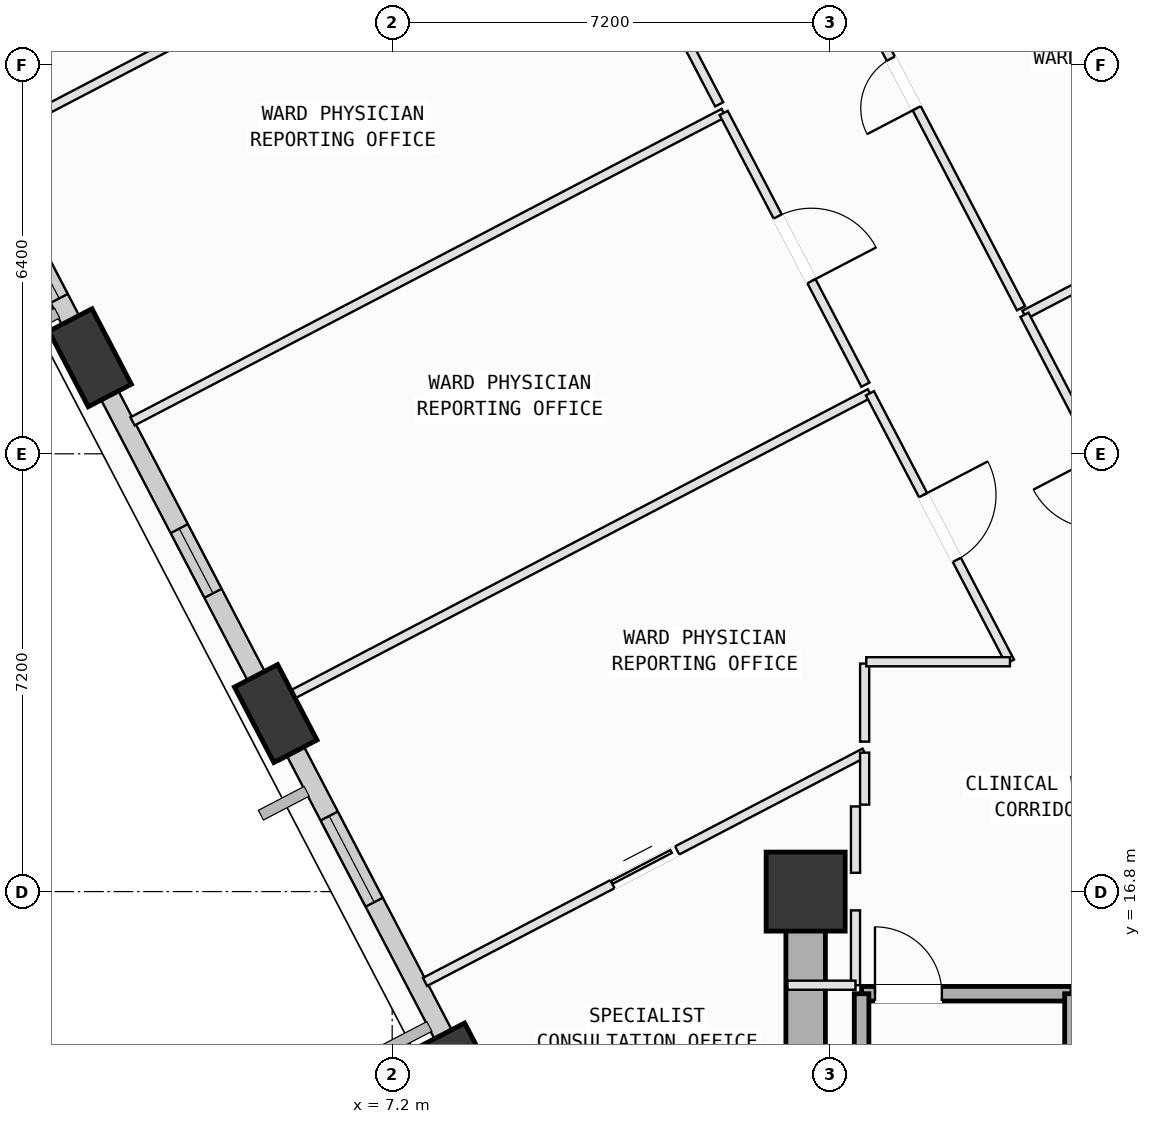
"""IFC4 building model, lengths in metres.
Left out: names, types, materials, properties, quantities, classifications, styles, units other than length and angle.
Written with IfcOpenShell. Run it as: python <this file> out.ifc"""

import sys

from ifc_helpers import new_model, si_unit, direction, frame, frame_2d, origin, origin_2d, place, context, subcontext, project, spatial, rectangle, extrude, element, fill, save


model = new_model("IFC4")
c1 = context("Model", 3, precision=1e-05, world=origin(), true_north=direction((0.0, 1.0)))
c2 = subcontext(c1, "Body", "Model", "MODEL_VIEW")
j1 = project(units=[si_unit("LENGTHUNIT", "METRE"), si_unit("PLANEANGLEUNIT", "RADIAN")], contexts=[c1])
p1 = place(None, origin())
s1 = spatial("IfcSite", under=j1, at=p1, CompositionType="ELEMENT")
p2 = place(p1, origin())
s2 = spatial("IfcBuilding", under=s1, at=p2, CompositionType="ELEMENT")
p3 = place(p2, frame((0.0, 0.0, 140.4)))
s3 = spatial("IfcBuildingStorey", under=s2, at=p3, CompositionType="ELEMENT", Elevation=140.4)
p4 = place(p3, frame((14.0, 16.8, 0.0), z_axis=(0.0, 0.0, 1.0), x_axis=(1.0, 0.0, 0.0)))
e1 = element("IfcColumn", 1, at=p4, inside=s3, PredefinedType="COLUMN", context=c2, shape_type="SweptSolid", body=[
    extrude(rectangle(XDim=1.3, YDim=1.3, at=origin_2d()), origin(), (0.0, 0.0, 1.0), 4.0),
])
p5 = place(p3, frame((2.232, 25.58, 0.002), z_axis=(-0.00211503443, -0.129017100255, 0.991640113384), x_axis=(-0.448049256138, 0.886658806791, 0.114402903869)))
e2 = element("IfcColumn", 2, at=p5, inside=s3, PredefinedType="COLUMN", context=c2, shape_type="SweptSolid", body=[
    extrude(rectangle(XDim=1.4, YDim=0.8, at=origin_2d()), origin(), (0.0, 0.0, 1.0), 3.925),
])
p6 = place(p3, frame((5.285, 19.728, 0.002), z_axis=(0.021879443382, -0.116358857988, 0.992966216004), x_axis=(-0.617245268463, 0.779736515973, 0.104972587944)))
e3 = element("IfcColumn", 3, at=p6, inside=s3, PredefinedType="COLUMN", context=c2, shape_type="SweptSolid", body=[
    extrude(rectangle(XDim=1.4, YDim=0.8, at=origin_2d()), origin(), (0.0, 0.0, 1.0), 3.928),
])
p7 = place(p3, frame((8.361, 13.833, 0.002), z_axis=(0.046037098105, -0.103567938652, 0.993556373681), x_axis=(-0.780457920553, 0.617080020514, 0.100487225696)))
e4 = element("IfcColumn", 4, at=p7, inside=s3, PredefinedType="COLUMN", context=c2, shape_type="SweptSolid", body=[
    extrude(rectangle(XDim=1.4, YDim=0.8, at=origin_2d()), origin(), (0.0, 0.0, 1.0), 3.93),
])
p8 = place(p3, frame((2.116, 25.803, 0.0), z_axis=(0.0, 0.0, 1.0), x_axis=(-0.462506359197, 0.886615964046, 0.0)))
e5 = element("IfcWall", 5, at=p8, inside=s3, PredefinedType="SOLIDWALL", context=c2, shape_type="SweptSolid", body=[
    extrude(rectangle(XDim=5.456, YDim=0.32, at=frame_2d((2.728, 0.0))), origin(), (0.0, 0.0, 1.0), 3.085),
])
p9 = place(p8, frame((0.848, 0.0, 0.75)))
e6 = element("IfcOpeningElement", 6, at=p9, cuts=e5, PredefinedType="OPENING", context=c2, shape_type="SweptSolid", body=[
    extrude(rectangle(XDim=1.8, YDim=2.05, at=frame_2d((0.9, 1.025))), frame((0.0, 0.17, 0.0), z_axis=(0.0, -1.0, 0.0), x_axis=(1.0, 0.0, 0.0)), (0.0, 0.0, 1.0), 0.34),
])
p10 = place(p3, frame((5.163, 19.962, 0.0), z_axis=(0.0, 0.0, 1.0), x_axis=(-0.462505217962, 0.886616559375, 0.0)))
e7 = element("IfcWall", 7, at=p10, inside=s3, PredefinedType="SOLIDWALL", context=c2, shape_type="SweptSolid", body=[
    extrude(rectangle(XDim=5.628, YDim=0.32, at=frame_2d((2.814, 0.0))), origin(), (0.0, 0.0, 1.0), 3.085),
])
p11 = place(p10, frame((1.967, 0.0, 0.75)))
e8 = element("IfcOpeningElement", 8, at=p11, cuts=e7, PredefinedType="OPENING", context=c2, shape_type="SweptSolid", body=[
    extrude(rectangle(XDim=1.2, YDim=1.75, at=frame_2d((0.6, 0.875))), frame((0.0, 0.17, 0.0), z_axis=(0.0, -1.0, 0.0), x_axis=(1.0, 0.0, 0.0)), (0.0, 0.0, 1.0), 0.34),
])
p12 = place(p3, frame((8.237, 14.071, 0.0), z_axis=(0.0, 0.0, 1.0), x_axis=(-0.462514432268, 0.886611752654, 0.0)))
e9 = element("IfcWall", 9, at=p12, inside=s3, PredefinedType="SOLIDWALL", context=c2, shape_type="SweptSolid", body=[
    extrude(rectangle(XDim=5.662, YDim=0.32, at=frame_2d((2.831, 0.0))), origin(), (0.0, 0.0, 1.0), 3.085),
])
p13 = place(p12, frame((2.881, 0.0, 0.75)))
e10 = element("IfcOpeningElement", 10, at=p13, cuts=e9, PredefinedType="OPENING", context=c2, shape_type="SweptSolid", body=[
    extrude(rectangle(XDim=1.6, YDim=1.95, at=frame_2d((0.8, 0.975))), frame((0.0, 0.17, 0.0), z_axis=(0.0, -1.0, 0.0), x_axis=(1.0, 0.0, 0.0)), (0.0, 0.0, 1.0), 0.34),
])
p14 = place(p3, frame((14.92, 15.12, 0.0), z_axis=(0.0, 0.0, 1.0), x_axis=(1.0, 0.0, 0.0)))
e11 = element("IfcWall", 11, at=p14, inside=s3, PredefinedType="SOLIDWALL", context=c2, shape_type="SweptSolid", body=[
    extrude(rectangle(XDim=3.46, YDim=0.24, at=frame_2d((1.73, 0.0))), origin(), (0.0, 0.0, 1.0), 3.7),
])
p15 = place(p14, frame((0.22, 0.0, 0.0)))
e12 = element("IfcOpeningElement", 12, at=p15, cuts=e11, PredefinedType="OPENING", context=c2, shape_type="SweptSolid", body=[
    extrude(rectangle(XDim=1.1, YDim=2.15, at=frame_2d((0.55, 1.075))), frame((0.0, 0.13, 0.0), z_axis=(0.0, -1.0, 0.0), x_axis=(1.0, 0.0, 0.0)), (0.0, 0.0, 1.0), 0.26),
])
for number, where, z_axis, x_axis in (
    (13, (18.38, 15.12, 0.0), (0.0, 0.0, 1.0), (0.0, -1.0, 0.0)),
    (14, (14.92, 8.125, 0.0), (0.0, 0.0, 1.0), (0.0, 1.0, 0.0)),
):
    element("IfcWall", number, at=place(p3, frame(where, z_axis=z_axis, x_axis=x_axis)), inside=s3, PredefinedType="SOLIDWALL", context=c2, shape_type="SweptSolid", body=[
        extrude(rectangle(XDim=6.995, YDim=0.24, at=frame_2d((3.498, 0.0))), origin(), (0.0, 0.0, 1.0), 3.7),
    ])
p16 = place(p3, frame((14.0, 16.8, 0.0), z_axis=(0.0, 0.0, 1.0), x_axis=(0.0, -1.0, 0.0)))
e15 = element("IfcWall", 15, at=p16, inside=s3, PredefinedType="SHEAR", context=c2, shape_type="SweptSolid", body=[
    extrude(rectangle(XDim=9.0, YDim=0.65, at=frame_2d((4.5, 0.0))), origin(), (0.0, 0.0, 1.0), 3.7),
])
p17 = place(p3, frame((14.82, 18.2, 0.0), z_axis=(0.0, 0.0, 1.0), x_axis=(0.0, -1.0, 0.0)))
e16 = element("IfcWall", 16, at=p17, inside=s3, PredefinedType="PARTITIONING", context=c2, shape_type="SweptSolid", body=[
    extrude(rectangle(XDim=1.091, YDim=0.15, at=frame_2d((0.545, 0.0))), origin(), (0.0, 0.0, 1.0), 3.7),
])
p18 = place(p3, frame((14.82, 16.491, 0.0), z_axis=(0.0, 0.0, 1.0), x_axis=(0.0, -1.0, 0.0)))
e17 = element("IfcWall", 17, at=p18, inside=s3, PredefinedType="PARTITIONING", context=c2, shape_type="SweptSolid", body=[
    extrude(rectangle(XDim=1.231, YDim=0.15, at=frame_2d((0.615, 0.0))), origin(), (0.0, 0.0, 1.0), 3.7),
])
p19 = place(p3, frame((14.82, 15.26, 0.0), z_axis=(0.0, 0.0, 1.0), x_axis=(-1.0, 0.0, 0.0)))
e18 = element("IfcWall", 18, at=p19, inside=s3, PredefinedType="PARTITIONING", context=c2, shape_type="SweptSolid", body=[
    extrude(rectangle(XDim=1.12, YDim=0.15, at=frame_2d((0.56, 0.0))), origin(), (0.0, 0.0, 1.0), 3.7),
])
p20 = place(p3, frame((7.74, 15.314, 0.0), z_axis=(0.0, 0.0, 1.0), x_axis=(0.886643562376, 0.46245344987, 0.0)))
e19 = element("IfcWall", 19, at=p20, inside=s3, PredefinedType="PARTITIONING", context=c2, shape_type="SweptSolid", body=[
    extrude(rectangle(XDim=8.154, YDim=0.15, at=frame_2d((4.077, 0.0))), origin(), (0.0, 0.0, 1.0), 3.7),
])
p21 = place(p20, frame((3.477, 0.0, 0.0)))
e20 = element("IfcOpeningElement", 20, at=p21, cuts=e19, PredefinedType="OPENING", context=c2, shape_type="SweptSolid", body=[
    extrude(rectangle(XDim=1.2, YDim=2.15, at=frame_2d((0.6, 1.075))), frame((0.0, 0.085, 0.0), z_axis=(0.0, -1.0, 0.0), x_axis=(1.0, 0.0, 0.0)), (0.0, 0.0, 1.0), 0.17),
])
p22 = place(p3, frame((14.97, 19.085, 0.0), z_axis=(0.0, 0.0, 1.0), x_axis=(0.0, -1.0, 0.0)))
e21 = element("IfcWall", 21, at=p22, inside=s3, PredefinedType="PARTITIONING", context=c2, shape_type="SweptSolid", body=[
    extrude(rectangle(XDim=0.855, YDim=0.15, at=frame_2d((0.427, 0.0))), origin(), (0.0, 0.0, 1.0), 3.7),
])
p23 = place(p3, frame((14.97, 20.55, 0.0), z_axis=(0.0, 0.0, 1.0), x_axis=(0.0, -1.0, 0.0)))
e22 = element("IfcWall", 22, at=p23, inside=s3, PredefinedType="PARTITIONING", context=c2, shape_type="SweptSolid", body=[
    extrude(rectangle(XDim=1.284, YDim=0.15, at=frame_2d((0.642, 0.0))), origin(), (0.0, 0.0, 1.0), 2.885),
])
p24 = place(p3, frame((5.414, 18.984, 0.0), z_axis=(0.0, 0.0, 1.0), x_axis=(-0.462422071375, 0.886659927991, 0.0)))
e23 = element("IfcWall", 23, at=p24, inside=s3, PredefinedType="PARTITIONING", context=c2, shape_type="SweptSolid", body=[
    extrude(rectangle(XDim=0.87, YDim=0.15, at=frame_2d((0.435, 0.0))), origin(), (0.0, 0.0, 1.0), 3.085),
])
p25 = place(p3, frame((5.28, 19.895, 0.0), z_axis=(0.0, 0.0, 1.0), x_axis=(0.886580898603, 0.462573572777, 0.0)))
e24 = element("IfcWall", 24, at=p25, inside=s3, PredefinedType="PARTITIONING", context=c2, shape_type="SweptSolid", body=[
    extrude(rectangle(XDim=11.028, YDim=0.15, at=frame_2d((5.514, 0.0))), origin(), (0.0, 0.0, 1.0), 3.7),
])
p26 = place(p3, frame((15.057, 24.996, 0.0), z_axis=(0.0, 0.0, 1.0), x_axis=(0.462442035221, -0.886649515908, 0.0)))
e25 = element("IfcWall", 25, at=p26, inside=s3, PredefinedType="PARTITIONING", context=c2, shape_type="SweptSolid", body=[
    extrude(rectangle(XDim=4.98, YDim=0.15, at=frame_2d((2.49, 0.0))), origin(), (0.0, 0.0, 1.0), 3.7),
])
p27 = place(p26, frame((1.89, 0.0, 0.0)))
e26 = element("IfcOpeningElement", 26, at=p27, cuts=e25, PredefinedType="OPENING", context=c2, shape_type="SweptSolid", body=[
    extrude(rectangle(XDim=1.2, YDim=2.15, at=frame_2d((0.6, 1.075))), frame((0.0, 0.085, 0.0), z_axis=(0.0, -1.0, 0.0), x_axis=(1.0, 0.0, 0.0)), (0.0, 0.0, 1.0), 0.17),
])
p28 = place(p3, frame((17.36, 20.58, 0.0), z_axis=(0.0, 0.0, 1.0), x_axis=(-1.0, 0.0, 0.0)))
e27 = element("IfcWall", 27, at=p28, inside=s3, PredefinedType="PARTITIONING", context=c2, shape_type="SweptSolid", body=[
    extrude(rectangle(XDim=2.363, YDim=0.15, at=frame_2d((1.182, 0.0))), origin(), (0.0, 0.0, 1.0), 3.7),
])
p29 = place(p3, frame((2.93, 24.534, 0.0), z_axis=(0.0, 0.0, 1.0), x_axis=(0.886600327973, 0.462536332019, 0.0)))
e28 = element("IfcWall", 28, at=p29, inside=s3, PredefinedType="PARTITIONING", context=c2, shape_type="SweptSolid", body=[
    extrude(rectangle(XDim=10.966, YDim=0.15, at=frame_2d((5.483, 0.0))), origin(), (0.0, 0.0, 1.0), 3.285),
])
p30 = place(p3, frame((12.652, 29.606, 0.0), z_axis=(0.0, 0.0, 1.0), x_axis=(0.462435226927, -0.886653066817, 0.0)))
e29 = element("IfcWall", 29, at=p30, inside=s3, PredefinedType="PARTITIONING", context=c2, shape_type="SweptSolid", body=[
    extrude(rectangle(XDim=5.04, YDim=0.15, at=frame_2d((2.52, 0.0))), origin(), (0.0, 0.0, 1.0), 3.7),
])
p31 = place(p30, frame((1.92, 0.0, 0.0)))
e30 = element("IfcOpeningElement", 30, at=p31, cuts=e29, PredefinedType="OPENING", context=c2, shape_type="SweptSolid", body=[
    extrude(rectangle(XDim=1.2, YDim=2.15, at=frame_2d((0.6, 1.075))), frame((0.0, 0.085, 0.0), z_axis=(0.0, -1.0, 0.0), x_axis=(1.0, 0.0, 0.0)), (0.0, 0.0, 1.0), 0.17),
])
p32 = place(p3, frame((0.525, 29.145, 0.0), z_axis=(0.0, 0.0, 1.0), x_axis=(0.886636847368, 0.462466324059, 0.0)))
e31 = element("IfcWall", 31, at=p32, inside=s3, PredefinedType="PARTITIONING", context=c2, shape_type="SweptSolid", body=[
    extrude(rectangle(XDim=10.965, YDim=0.15, at=frame_2d((5.483, 0.0))), origin(), (0.0, 0.0, 1.0), 3.7),
])
p33 = place(p3, frame((10.247, 34.216, 0.0), z_axis=(0.0, 0.0, 1.0), x_axis=(0.462514680435, -0.886611623194, 0.0)))
e32 = element("IfcWall", 32, at=p33, inside=s3, PredefinedType="PARTITIONING", context=c2, shape_type="SweptSolid", body=[
    extrude(rectangle(XDim=5.04, YDim=0.15, at=frame_2d((2.52, 0.0))), origin(), (0.0, 0.0, 1.0), 3.7),
])
p34 = place(p33, frame((1.92, 0.0, 0.0)))
e33 = element("IfcOpeningElement", 33, at=p34, cuts=e32, PredefinedType="OPENING", context=c2, shape_type="SweptSolid", body=[
    extrude(rectangle(XDim=1.2, YDim=2.15, at=frame_2d((0.6, 1.075))), frame((0.0, 0.085, 0.0), z_axis=(0.0, -1.0, 0.0), x_axis=(1.0, 0.0, 0.0)), (0.0, 0.0, 1.0), 0.17),
])
p35 = place(p3, frame((2.357, 24.845, 0.0), z_axis=(0.0, 0.0, 1.0), x_axis=(-0.462791687413, 0.886467063157, 0.0)))
e34 = element("IfcWall", 34, at=p35, inside=s3, PredefinedType="PARTITIONING", context=c2, shape_type="SweptSolid", body=[
    extrude(rectangle(XDim=0.961, YDim=0.15, at=frame_2d((0.48, 0.0))), origin(), (0.0, 0.0, 1.0), 3.085),
])
p36 = place(p3, frame((17.598, 26.287, 0.0), z_axis=(0.0, 0.0, 1.0), x_axis=(0.886614228897, 0.462509685431, 0.0)))
e35 = element("IfcWall", 35, at=p36, inside=s3, PredefinedType="PARTITIONING", context=c2, shape_type="SweptSolid", body=[
    extrude(rectangle(XDim=6.815, YDim=0.15, at=frame_2d((3.407, 0.0))), origin(), (0.0, 0.0, 1.0), 3.7),
])
p37 = place(p3, frame((20.575, 20.58, 0.0), z_axis=(0.0, 0.0, 1.0), x_axis=(-0.462501194351, 0.886618658288, 0.0)))
e36 = element("IfcWall", 36, at=p37, inside=s3, PredefinedType="PARTITIONING", context=c2, shape_type="SweptSolid", body=[
    extrude(rectangle(XDim=6.437, YDim=0.15, at=frame_2d((3.218, 0.0))), origin(), (0.0, 0.0, 1.0), 3.7),
])
p38 = place(p37, frame((2.618, 0.0, 0.0)))
e37 = element("IfcOpeningElement", 37, at=p38, cuts=e36, PredefinedType="OPENING", context=c2, shape_type="SweptSolid", body=[
    extrude(rectangle(XDim=1.2, YDim=2.15, at=frame_2d((0.6, 1.075))), frame((0.0, 0.085, 0.0), z_axis=(0.0, -1.0, 0.0), x_axis=(1.0, 0.0, 0.0)), (0.0, 0.0, 1.0), 0.17),
])
p39 = place(p3, frame((17.542, 26.394, 0.0), z_axis=(0.0, 0.0, 1.0), x_axis=(-0.46248796698, 0.886625558169, 0.0)))
e38 = element("IfcWall", 38, at=p39, inside=s3, PredefinedType="PARTITIONING", context=c2, shape_type="SweptSolid", body=[
    extrude(rectangle(XDim=8.34, YDim=0.15, at=frame_2d((4.17, 0.0))), origin(), (0.0, 0.0, 1.0), 3.7),
])
p40 = place(p39, frame((3.71, 0.0, 0.0)))
e39 = element("IfcOpeningElement", 39, at=p40, cuts=e38, PredefinedType="OPENING", context=c2, shape_type="SweptSolid", body=[
    extrude(rectangle(XDim=0.92, YDim=2.1, at=frame_2d((0.46, 1.05))), frame((0.0, 0.085, 0.0), z_axis=(0.0, -1.0, 0.0), x_axis=(1.0, 0.0, 0.0)), (0.0, 0.0, 1.0), 0.17),
])
p41 = place(p9, origin())
e40 = element("IfcWindow", 40, at=p41, inside=s3, PartitioningType="SINGLE_PANEL", PredefinedType="WINDOW", context=c2, shape_type="SweptSolid", body=[
    extrude(rectangle(XDim=1.8, YDim=2.05, at=frame_2d((0.9, 1.025))), frame((0.0, 0.03, 0.0), z_axis=(0.0, -1.0, 0.0), x_axis=(1.0, 0.0, 0.0)), (0.0, 0.0, 1.0), 0.06),
])
fill(e6, e40)
p42 = place(p11, origin())
e41 = element("IfcWindow", 41, at=p42, inside=s3, PartitioningType="SINGLE_PANEL", PredefinedType="WINDOW", context=c2, shape_type="SweptSolid", body=[
    extrude(rectangle(XDim=1.2, YDim=1.75, at=frame_2d((0.6, 0.875))), frame((0.0, 0.03, 0.0), z_axis=(0.0, -1.0, 0.0), x_axis=(1.0, 0.0, 0.0)), (0.0, 0.0, 1.0), 0.06),
])
fill(e8, e41)
p43 = place(p13, origin())
e42 = element("IfcWindow", 42, at=p43, inside=s3, PartitioningType="SINGLE_PANEL", PredefinedType="WINDOW", context=c2, shape_type="SweptSolid", body=[
    extrude(rectangle(XDim=1.6, YDim=1.95, at=frame_2d((0.8, 0.975))), frame((0.0, 0.03, 0.0), z_axis=(0.0, -1.0, 0.0), x_axis=(1.0, 0.0, 0.0)), (0.0, 0.0, 1.0), 0.06),
])
fill(e10, e42)
p44 = place(p15, origin())
e43 = element("IfcDoor", 43, at=p44, inside=s3, OperationType="SINGLE_SWING_LEFT", PredefinedType="DOOR", context=c2, shape_type="SweptSolid", body=[
    extrude(rectangle(XDim=1.1, YDim=2.15, at=frame_2d((0.55, 1.075))), frame((0.0, 0.025, 0.0), z_axis=(0.0, -1.0, 0.0), x_axis=(1.0, 0.0, 0.0)), (0.0, 0.0, 1.0), 0.05),
])
fill(e12, e43)
p45 = place(p27, origin())
e44 = element("IfcDoor", 44, at=p45, inside=s3, OperationType="SINGLE_SWING_LEFT", PredefinedType="DOOR", context=c2, shape_type="SweptSolid", body=[
    extrude(rectangle(XDim=1.2, YDim=2.15, at=frame_2d((0.6, 1.075))), frame((0.0, 0.025, 0.0), z_axis=(0.0, -1.0, 0.0), x_axis=(1.0, 0.0, 0.0)), (0.0, 0.0, 1.0), 0.05),
])
fill(e26, e44)
p46 = place(p31, origin())
e45 = element("IfcDoor", 45, at=p46, inside=s3, OperationType="SINGLE_SWING_RIGHT", PredefinedType="DOOR", context=c2, shape_type="SweptSolid", body=[
    extrude(rectangle(XDim=1.2, YDim=2.15, at=frame_2d((0.6, 1.075))), frame((0.0, 0.025, 0.0), z_axis=(0.0, -1.0, 0.0), x_axis=(1.0, 0.0, 0.0)), (0.0, 0.0, 1.0), 0.05),
])
fill(e30, e45)
p47 = place(p40, origin())
e46 = element("IfcDoor", 46, at=p47, inside=s3, OperationType="SINGLE_SWING_LEFT", PredefinedType="DOOR", context=c2, shape_type="SweptSolid", body=[
    extrude(rectangle(XDim=0.92, YDim=2.1, at=frame_2d((0.46, 1.05))), frame((0.0, 0.025, 0.0), z_axis=(0.0, -1.0, 0.0), x_axis=(1.0, 0.0, 0.0)), (0.0, 0.0, 1.0), 0.05),
])
fill(e39, e46)
p48 = place(p21, origin())
e47 = element("IfcDoor", 47, at=p48, inside=s3, OperationType="SLIDING_TO_LEFT", PredefinedType="DOOR", context=c2, shape_type="SweptSolid", body=[
    extrude(rectangle(XDim=1.2, YDim=2.15, at=frame_2d((0.6, 1.075))), frame((0.0, 0.025, 0.0), z_axis=(0.0, -1.0, 0.0), x_axis=(1.0, 0.0, 0.0)), (0.0, 0.0, 1.0), 0.05),
])
fill(e20, e47)
save(model, sys.argv[1])
